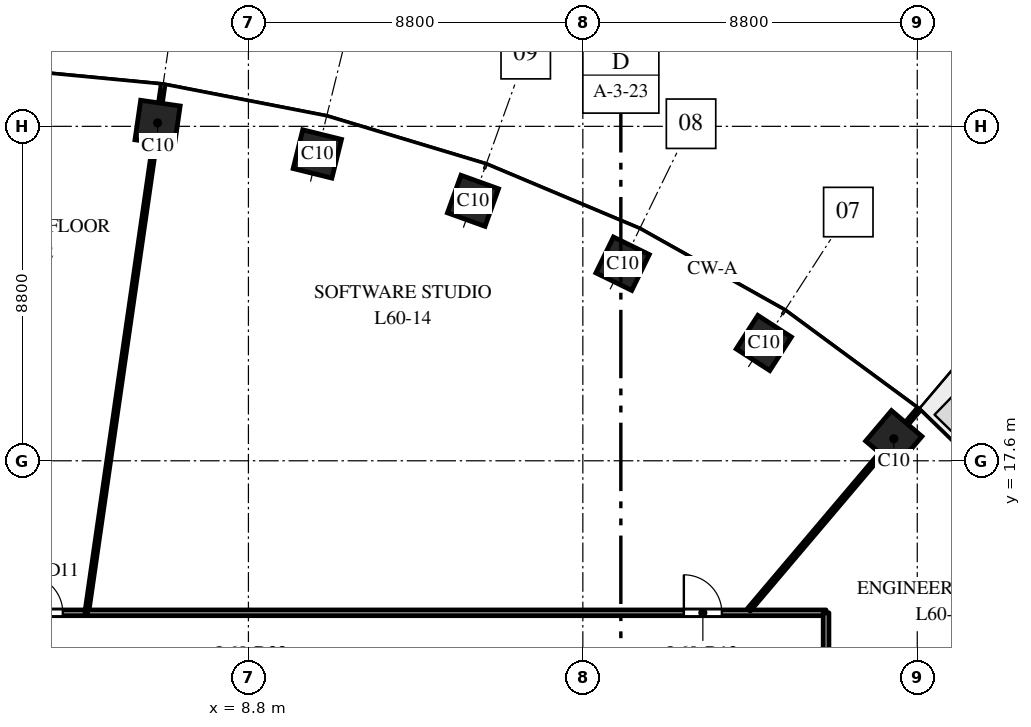
"""IFC4 building model, lengths in metres.
Left out: names, types, materials, properties, quantities, classifications, styles, units other than length and angle.
Written with IfcOpenShell. Run it as: python <this file> out.ifc"""

import sys

from ifc_helpers import new_model, si_unit, direction, frame, frame_2d, origin, origin_2d, place, context, subcontext, project, spatial, rectangle, extrude, element, fill, save


model = new_model("IFC4")
c1 = context("Model", 3, precision=1e-05, world=origin(), true_north=direction((0.0, 1.0)))
c2 = subcontext(c1, "Body", "Model", "MODEL_VIEW")
j1 = project(units=[si_unit("LENGTHUNIT", "METRE"), si_unit("PLANEANGLEUNIT", "RADIAN")], contexts=[c1])
p1 = place(None, origin())
s1 = spatial("IfcSite", under=j1, at=p1, CompositionType="ELEMENT")
p2 = place(p1, origin())
s2 = spatial("IfcBuilding", under=s1, at=p2, CompositionType="ELEMENT")
p3 = place(p2, frame((0.0, 0.0, 281.5)))
s3 = spatial("IfcBuildingStorey", under=s2, at=p3, CompositionType="ELEMENT", Elevation=281.5)
for number, where, z_axis, x_axis in (
    (1, (25.783, 18.18, 0.0), (0.0, 0.0, 1.0), (-0.763, 0.646, 0.0)),
    (2, (22.362, 20.7, 0.0), (0.0, 0.0, 1.0), (-0.84, 0.542, 0.0)),
    (3, (18.646, 22.785, 0.0), (0.0, 0.0, 1.0), (-0.898, 0.439, 0.0)),
    (4, (14.709, 24.441, 0.0), (0.0, 0.0, 1.0), (-0.941, 0.338, 0.0)),
    (5, (10.613, 25.674, 0.0), (0.0, 0.0, 1.0), (-0.971, 0.24, 0.0)),
    (6, (6.409, 26.491, 0.0), (0.0, 0.0, 1.0), (-0.99, 0.143, 0.0)),
):
    element("IfcColumn", number, at=place(p3, frame(where, z_axis=z_axis, x_axis=x_axis)), inside=s3, PredefinedType="COLUMN", context=c2, shape_type="SweptSolid", body=[
        extrude(rectangle(XDim=1.05, YDim=1.05, at=origin_2d()), origin(), (0.0, 0.0, 1.0), 4.0),
    ])
p4 = place(p3, frame((-10.758, 13.6, 0.0), z_axis=(0.0, 0.0, 1.0), x_axis=(1.0, 0.0, 0.0)))
e7 = element("IfcWall", 7, at=p4, inside=s3, PredefinedType="PARTITIONING", context=c2, shape_type="SweptSolid", body=[
    extrude(rectangle(XDim=15.304, YDim=0.15, at=frame_2d((7.652, 0.0))), origin(), (0.0, 0.0, 1.0), 2.85),
])
p5 = place(p4, frame((0.511, 0.0, 0.0)))
e8 = element("IfcOpeningElement", 8, at=p5, cuts=e7, PredefinedType="OPENING", context=c2, shape_type="SweptSolid", body=[
    extrude(rectangle(XDim=1.0, YDim=2.1, at=frame_2d((0.5, 1.05))), frame((0.0, 0.085, 0.0), z_axis=(0.0, -1.0, 0.0), x_axis=(1.0, 0.0, 0.0)), (0.0, 0.0, 1.0), 0.17),
])
p6 = place(p4, frame((13.674, 0.0, 0.0)))
e9 = element("IfcOpeningElement", 9, at=p6, cuts=e7, PredefinedType="OPENING", context=c2, shape_type="SweptSolid", body=[
    extrude(rectangle(XDim=1.0, YDim=2.1, at=frame_2d((0.5, 1.05))), frame((0.0, 0.085, 0.0), z_axis=(0.0, -1.0, 0.0), x_axis=(1.0, 0.0, 0.0)), (0.0, 0.0, 1.0), 0.17),
])
p7 = place(p3, frame((4.546, 13.604, 0.0), z_axis=(0.0, 0.0, 1.0), x_axis=(0.143076365974, 0.989711651694, 0.0)))
e10 = element("IfcWall", 10, at=p7, inside=s3, PredefinedType="PARTITIONING", context=c2, shape_type="SweptSolid", body=[
    extrude(rectangle(XDim=14.021, YDim=0.1, at=frame_2d((7.011, 0.0))), origin(), (0.0, 0.0, 1.0), 2.85),
])
p8 = place(p3, frame((4.566, 13.6, 0.0), z_axis=(0.0, 0.0, 1.0), x_axis=(1.0, 0.0, 0.0)))
e11 = element("IfcWall", 11, at=p8, inside=s3, PredefinedType="PARTITIONING", context=c2, shape_type="SweptSolid", body=[
    extrude(rectangle(XDim=19.434, YDim=0.15, at=frame_2d((9.717, 0.0))), origin(), (0.0, 0.0, 1.0), 2.85),
])
p9 = place(p8, frame((15.692, 0.0, 0.0)))
e12 = element("IfcOpeningElement", 12, at=p9, cuts=e11, PredefinedType="OPENING", context=c2, shape_type="SweptSolid", body=[
    extrude(rectangle(XDim=1.0, YDim=2.1, at=frame_2d((0.5, 1.05))), frame((0.0, 0.085, 0.0), z_axis=(0.0, -1.0, 0.0), x_axis=(1.0, 0.0, 0.0)), (0.0, 0.0, 1.0), 0.17),
])
p10 = place(p3, frame((21.968, 13.678, 0.0), z_axis=(0.0, 0.0, 1.0), x_axis=(0.646376547424, 0.763018583614, 0.0)))
e13 = element("IfcWall", 13, at=p10, inside=s3, PredefinedType="PARTITIONING", context=c2, shape_type="SweptSolid", body=[
    extrude(rectangle(XDim=6.903, YDim=0.1, at=frame_2d((3.452, 0.0))), origin(), (0.0, 0.0, 1.0), 3.0),
])
p11 = place(p3, frame((24.0, 10.7, 0.0), z_axis=(0.0, 0.0, 1.0), x_axis=(0.0, 1.0, 0.0)))
e14 = element("IfcWall", 14, at=p11, inside=s3, PredefinedType="PARTITIONING", context=c2, shape_type="SweptSolid", body=[
    extrude(rectangle(XDim=2.9, YDim=0.15, at=frame_2d((1.45, 0.0))), origin(), (0.0, 0.0, 1.0), 2.75),
])
p12 = place(p6, origin())
e15 = element("IfcDoor", 15, at=p12, inside=s3, OperationType="SINGLE_SWING_LEFT", PredefinedType="DOOR", context=c2, shape_type="SweptSolid", body=[
    extrude(rectangle(XDim=1.0, YDim=2.1, at=frame_2d((0.5, 1.05))), frame((0.0, 0.025, 0.0), z_axis=(0.0, -1.0, 0.0), x_axis=(1.0, 0.0, 0.0)), (0.0, 0.0, 1.0), 0.05),
])
fill(e9, e15)
p13 = place(p9, origin())
e16 = element("IfcDoor", 16, at=p13, inside=s3, OperationType="SINGLE_SWING_LEFT", PredefinedType="DOOR", context=c2, shape_type="SweptSolid", body=[
    extrude(rectangle(XDim=1.0, YDim=2.1, at=frame_2d((0.5, 1.05))), frame((0.0, 0.025, 0.0), z_axis=(0.0, -1.0, 0.0), x_axis=(1.0, 0.0, 0.0)), (0.0, 0.0, 1.0), 0.05),
])
fill(e12, e16)
save(model, sys.argv[1])
